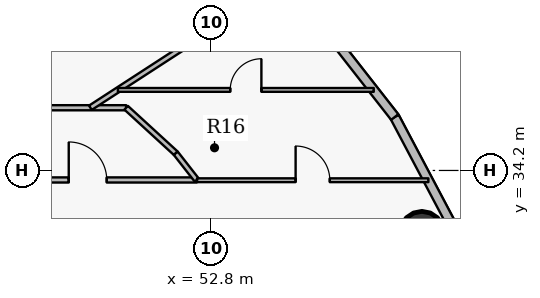
"""IFC4 building model, lengths in metres.
Left out: names, types, materials, properties, quantities, classifications, styles, units other than length and angle.
Written with IfcOpenShell. Run it as: python <this file> out.ifc"""

import sys

from ifc_helpers import new_model, si_unit, direction, frame, frame_2d, origin, origin_2d, place, context, subcontext, project, spatial, rectangle, hollow_circle, extrude, source, transform, mapped, element, fill, save


model = new_model("IFC4")
c1 = context("Model", 3, precision=1e-05, world=origin(), true_north=direction((0.0, 1.0)))
c2 = subcontext(c1, "Body", "Model", "MODEL_VIEW")
j1 = project(units=[si_unit("LENGTHUNIT", "METRE"), si_unit("PLANEANGLEUNIT", "RADIAN")], contexts=[c1])
p1 = place(None, origin())
s1 = spatial("IfcSite", under=j1, at=p1, CompositionType="ELEMENT")
p2 = place(p1, origin())
s2 = spatial("IfcBuilding", under=s1, at=p2, CompositionType="ELEMENT")
p3 = place(p2, frame((0.0, 0.0, 217.8)))
s3 = spatial("IfcBuildingStorey", under=s2, at=p3, CompositionType="ELEMENT", Elevation=217.8)
p4 = place(p3, frame((58.351, 32.549, 0.0), z_axis=(0.0, 0.0, 1.0), x_axis=(1.0, 0.0, 0.0)))
e1 = element("IfcColumn", 1, at=p4, inside=s3, PredefinedType="COLUMN", context=c2, shape_type="SweptSolid", body=[
    extrude(hollow_circle(Radius=0.575, WallThickness=0.036, at=origin_2d()), origin(), (0.0, 0.0, 1.0), 3.75),
])
p5 = place(p3, frame((57.636, 35.605, 0.0), z_axis=(0.0, 0.0, 1.0), x_axis=(0.46766049993, -0.883908172157, 0.0)))
e2 = element("IfcWall", 2, at=p5, inside=s3, PredefinedType="SOLIDWALL", context=c2, shape_type="SweptSolid", body=[
    extrude(rectangle(XDim=3.11, YDim=0.24, at=frame_2d((1.555, 0.0))), origin(), (0.0, 0.0, 1.0), 3.5),
])
p6 = place(p3, frame((55.648, 38.145, 0.0), z_axis=(0.0, 0.0, 1.0), x_axis=(0.616312344705, -0.787501805562, 0.0)))
e3 = element("IfcWall", 3, at=p6, inside=s3, PredefinedType="SOLIDWALL", context=c2, shape_type="SweptSolid", body=[
    extrude(rectangle(XDim=3.225, YDim=0.24, at=frame_2d((1.612, 0.0))), origin(), (0.0, 0.0, 1.0), 3.5),
])
p7 = place(p3, frame((24.35, 35.85, 0.0), z_axis=(0.0, 0.0, 1.0), x_axis=(1.0, 0.0, 0.0)))
e4 = element("IfcWall", 4, at=p7, inside=s3, PredefinedType="PARTITIONING", context=c2, shape_type="SweptSolid", body=[
    extrude(rectangle(XDim=26.218, YDim=0.135, at=frame_2d((13.109, 0.0))), origin(), (0.0, 0.0, 1.0), 2.935),
])
p8 = place(p7, frame((21.507, 0.0, 0.0)))
e5 = element("IfcOpeningElement", 5, at=p8, cuts=e4, PredefinedType="OPENING", context=c2, shape_type="SweptSolid", body=[
    extrude(rectangle(XDim=1.0, YDim=2.15, at=origin_2d()), frame((0.5, 0.078, 1.075), z_axis=(0.0, -1.0, 0.0), x_axis=(1.0, 0.0, 0.0)), (0.0, 0.0, 1.0), 0.155),
])
p9 = place(p7, frame((12.95, 0.0, 0.0)))
e6 = element("IfcOpeningElement", 6, at=p9, cuts=e4, PredefinedType="OPENING", context=c2, shape_type="SweptSolid", body=[
    extrude(rectangle(XDim=1.0, YDim=2.15, at=origin_2d()), frame((0.5, 0.078, 1.075), z_axis=(0.0, -1.0, 0.0), x_axis=(1.0, 0.0, 0.0)), (0.0, 0.0, 1.0), 0.155),
])
p10 = place(p7, frame((2.293, 0.0, 0.0)))
e7 = element("IfcOpeningElement", 7, at=p10, cuts=e4, PredefinedType="OPENING", context=c2, shape_type="SweptSolid", body=[
    extrude(rectangle(XDim=1.0, YDim=2.15, at=origin_2d()), frame((0.5, 0.078, 1.075), z_axis=(0.0, -1.0, 0.0), x_axis=(1.0, 0.0, 0.0)), (0.0, 0.0, 1.0), 0.155),
])
p11 = place(p3, frame((46.691, 33.95, 0.0), z_axis=(0.0, 0.0, 1.0), x_axis=(1.0, 0.0, 0.0)))
e8 = element("IfcWall", 8, at=p11, inside=s3, PredefinedType="PARTITIONING", context=c2, shape_type="SweptSolid", body=[
    extrude(rectangle(XDim=5.733, YDim=0.135, at=frame_2d((2.866, 0.0))), origin(), (0.0, 0.0, 1.0), 3.5),
])
p12 = place(p11, frame((2.366, 0.0, 0.0)))
e9 = element("IfcOpeningElement", 9, at=p12, cuts=e8, PredefinedType="OPENING", context=c2, shape_type="SweptSolid", body=[
    extrude(rectangle(XDim=1.0, YDim=2.15, at=origin_2d()), frame((0.5, 0.078, 1.075), z_axis=(0.0, -1.0, 0.0), x_axis=(1.0, 0.0, 0.0)), (0.0, 0.0, 1.0), 0.155),
])
p13 = place(p3, frame((49.628, 35.85, 0.0), z_axis=(0.0, 0.0, 1.0), x_axis=(0.838688976762, 0.544610686875, 0.0)))
e10 = element("IfcWall", 10, at=p13, inside=s3, PredefinedType="PARTITIONING", context=c2, shape_type="SweptSolid", body=[
    extrude(rectangle(XDim=5.954, YDim=0.135, at=frame_2d((2.977, 0.0))), origin(), (0.0, 0.0, 1.0), 2.985),
])
p14 = place(p3, frame((50.351, 36.319, 0.0), z_axis=(0.0, 0.0, 1.0), x_axis=(1.0, 0.0, 0.0)))
e11 = element("IfcWall", 11, at=p14, inside=s3, PredefinedType="PARTITIONING", context=c2, shape_type="SweptSolid", body=[
    extrude(rectangle(XDim=6.733, YDim=0.1, at=frame_2d((3.366, 0.0))), origin(), (0.0, 0.0, 1.0), 2.985),
])
p15 = place(p14, frame((2.956, 0.0, 0.0)))
e12 = element("IfcOpeningElement", 12, at=p15, cuts=e11, PredefinedType="OPENING", context=c2, shape_type="SweptSolid", body=[
    extrude(rectangle(XDim=0.82, YDim=2.1, at=origin_2d()), frame((0.41, 0.06, 1.05), z_axis=(0.0, -1.0, 0.0), x_axis=(1.0, 0.0, 0.0)), (0.0, 0.0, 1.0), 0.12),
])
p16 = place(p3, frame((50.568, 35.85, 0.0), z_axis=(0.0, 0.0, 1.0), x_axis=(0.737102657331, -0.675780787353, 0.0)))
e13 = element("IfcWall", 13, at=p16, inside=s3, PredefinedType="PARTITIONING", context=c2, shape_type="SweptSolid", body=[
    extrude(rectangle(XDim=1.772, YDim=0.135, at=frame_2d((0.886, 0.0))), origin(), (0.0, 0.0, 1.0), 3.5),
])
p17 = place(p3, frame((51.874, 34.653, 0.0), z_axis=(0.0, 0.0, 1.0), x_axis=(0.61628613448, -0.787522317429, 0.0)))
e14 = element("IfcWall", 14, at=p17, inside=s3, PredefinedType="PARTITIONING", context=c2, shape_type="SweptSolid", body=[
    extrude(rectangle(XDim=0.893, YDim=0.135, at=frame_2d((0.446, 0.0))), origin(), (0.0, 0.0, 1.0), 3.5),
])
p18 = place(p3, frame((52.434, 33.943, 0.0), z_axis=(0.0, 0.0, 1.0), x_axis=(1.0, 0.0, 0.0)))
e15 = element("IfcWall", 15, at=p18, inside=s3, PredefinedType="PARTITIONING", context=c2, shape_type="SweptSolid", body=[
    extrude(rectangle(XDim=6.087, YDim=0.1, at=frame_2d((3.043, 0.0))), origin(), (0.0, 0.0, 1.0), 2.985),
])
p19 = place(p18, frame((2.594, 0.0, 0.0)))
e16 = element("IfcOpeningElement", 16, at=p19, cuts=e15, PredefinedType="OPENING", context=c2, shape_type="SweptSolid", body=[
    extrude(rectangle(XDim=0.9, YDim=2.1, at=origin_2d()), frame((0.45, 0.06, 1.05), z_axis=(0.0, -1.0, 0.0), x_axis=(1.0, 0.0, 0.0)), (0.0, 0.0, 1.0), 0.12),
])
m1 = source(origin(), c2, "Body", "SweptSolid", [
    extrude(rectangle(XDim=1.0, YDim=2.15, at=origin_2d()), frame((0.5, 0.025, 1.075), z_axis=(0.0, -1.0, 0.0), x_axis=(1.0, 0.0, 0.0)), (0.0, 0.0, 1.0), 0.05),
])
p20 = place(p12, origin())
e17 = element("IfcDoor", 17, at=p20, inside=s3, OperationType="SINGLE_SWING_LEFT", PredefinedType="DOOR", context=c2, shape_type="MappedRepresentation", body=[
    mapped(m1, transform((0.0, 0.0, 0.0), x_axis=(1.0, 0.0, 0.0), y_axis=(0.0, 1.0, 0.0), z_axis=(0.0, 0.0, 1.0), scale=1.0)),
])
fill(e9, e17)
m2 = source(origin(), c2, "Body", "SweptSolid", [
    extrude(rectangle(XDim=0.9, YDim=2.1, at=origin_2d()), frame((0.45, 0.025, 1.05), z_axis=(0.0, -1.0, 0.0), x_axis=(1.0, 0.0, 0.0)), (0.0, 0.0, 1.0), 0.05),
])
p21 = place(p19, origin())
e18 = element("IfcDoor", 18, at=p21, inside=s3, OperationType="SINGLE_SWING_LEFT", PredefinedType="DOOR", context=c2, shape_type="MappedRepresentation", body=[
    mapped(m2, transform((0.0, 0.0, 0.0), x_axis=(1.0, 0.0, 0.0), y_axis=(0.0, 1.0, 0.0), z_axis=(0.0, 0.0, 1.0), scale=1.0)),
])
fill(e16, e18)
m3 = source(origin(), c2, "Body", "SweptSolid", [
    extrude(rectangle(XDim=0.82, YDim=2.1, at=origin_2d()), frame((0.41, 0.025, 1.05), z_axis=(0.0, -1.0, 0.0), x_axis=(1.0, 0.0, 0.0)), (0.0, 0.0, 1.0), 0.05),
])
p22 = place(p15, origin())
e19 = element("IfcDoor", 19, at=p22, inside=s3, OperationType="SINGLE_SWING_RIGHT", PredefinedType="DOOR", context=c2, shape_type="MappedRepresentation", body=[
    mapped(m3, transform((0.0, 0.0, 0.0), x_axis=(1.0, 0.0, 0.0), y_axis=(0.0, 1.0, 0.0), z_axis=(0.0, 0.0, 1.0), scale=1.0)),
])
fill(e12, e19)
save(model, sys.argv[1])
